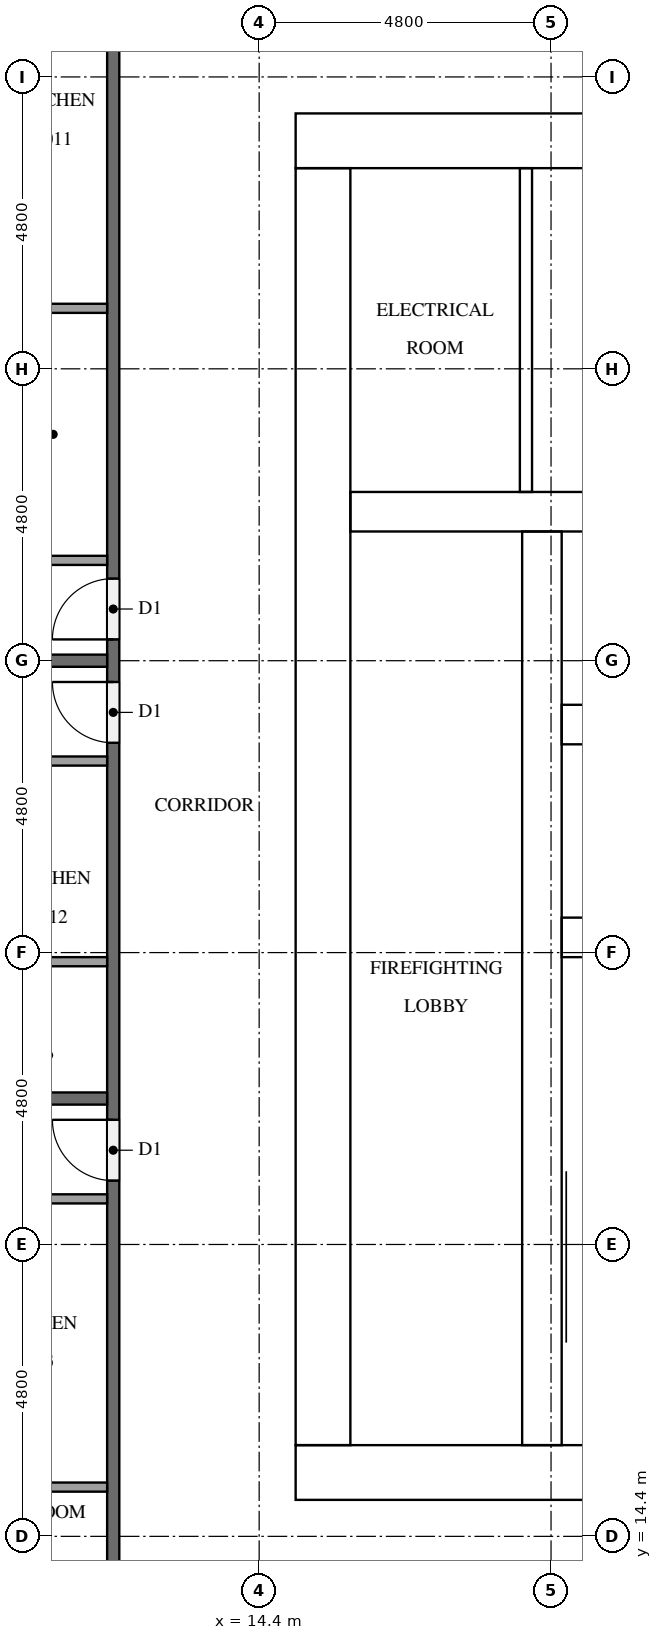
"""IFC4 building model, lengths in metres.
Left out: names, types, materials, properties, quantities, classifications, styles, units other than length and angle.
Written with IfcOpenShell. Run it as: python <this file> out.ifc"""

import sys

from ifc_helpers import new_model, si_unit, direction, frame, frame_2d, origin, place, context, subcontext, project, spatial, rectangle, extrude, element, fill, save


model = new_model("IFC4")
c1 = context("Model", 3, precision=1e-05, world=origin(), true_north=direction((0.0, 1.0)))
c2 = subcontext(c1, "Body", "Model", "MODEL_VIEW")
j1 = project(units=[si_unit("LENGTHUNIT", "METRE"), si_unit("PLANEANGLEUNIT", "RADIAN")], contexts=[c1])
p1 = place(None, origin())
s1 = spatial("IfcSite", under=j1, at=p1, CompositionType="ELEMENT")
p2 = place(p1, origin())
s2 = spatial("IfcBuilding", under=s1, at=p2, CompositionType="ELEMENT")
p3 = place(p2, frame((0.0, 0.0, 80.3)))
s3 = spatial("IfcBuildingStorey", under=s2, at=p3, CompositionType="ELEMENT", Elevation=80.3)
p4 = place(p3, frame((15.0, 15.45, 0.0), z_axis=(0.0, 0.0, 1.0), x_axis=(1.0, 0.0, 0.0)))
e1 = element("IfcWall", 1, at=p4, inside=s3, PredefinedType="SHEAR", context=c2, shape_type="SweptSolid", body=[
    extrude(rectangle(XDim=32.4, YDim=0.9, at=frame_2d((16.2, 0.0))), origin(), (0.0, 0.0, 1.0), 3.1),
])
p5 = place(p4, frame((15.3, 0.0, 0.0)))
e2 = element("IfcOpeningElement", 2, at=p5, cuts=e1, PredefinedType="OPENING", context=c2, shape_type="SweptSolid", body=[
    extrude(rectangle(XDim=1.8, YDim=2.1, at=frame_2d((0.9, 1.05))), frame((0.0, 0.46, 0.0), z_axis=(0.0, -1.0, 0.0), x_axis=(1.0, 0.0, 0.0)), (0.0, 0.0, 1.0), 0.92),
])
p6 = place(p3, frame((15.0, 37.35, 0.0), z_axis=(0.0, 0.0, 1.0), x_axis=(1.0, 0.0, 0.0)))
e3 = element("IfcWall", 3, at=p6, inside=s3, PredefinedType="SHEAR", context=c2, shape_type="SweptSolid", body=[
    extrude(rectangle(XDim=32.4, YDim=0.9, at=frame_2d((16.2, 0.0))), origin(), (0.0, 0.0, 1.0), 3.1),
])
p7 = place(p6, frame((15.3, 0.0, 0.0)))
e4 = element("IfcOpeningElement", 4, at=p7, cuts=e3, PredefinedType="OPENING", context=c2, shape_type="SweptSolid", body=[
    extrude(rectangle(XDim=1.8, YDim=2.1, at=frame_2d((0.9, 1.05))), frame((0.0, 0.46, 0.0), z_axis=(0.0, -1.0, 0.0), x_axis=(1.0, 0.0, 0.0)), (0.0, 0.0, 1.0), 0.92),
])
p8 = place(p6, frame((1.794, 0.0, 0.0)))
e5 = element("IfcOpeningElement", 5, at=p8, cuts=e3, PredefinedType="OPENING", context=c2, shape_type="SweptSolid", body=[
    extrude(rectangle(XDim=1.0, YDim=2.1, at=frame_2d((0.5, 1.05))), frame((0.0, 0.46, 0.0), z_axis=(0.0, -1.0, 0.0), x_axis=(1.0, 0.0, 0.0)), (0.0, 0.0, 1.0), 0.92),
])
p9 = place(p6, frame((5.331, 0.0, 0.0)))
e6 = element("IfcOpeningElement", 6, at=p9, cuts=e3, PredefinedType="OPENING", context=c2, shape_type="SweptSolid", body=[
    extrude(rectangle(XDim=1.0, YDim=2.1, at=frame_2d((0.5, 1.05))), frame((0.0, 0.46, 0.0), z_axis=(0.0, -1.0, 0.0), x_axis=(1.0, 0.0, 0.0)), (0.0, 0.0, 1.0), 0.92),
])
p10 = place(p3, frame((15.45, 15.9, 0.0), z_axis=(0.0, 0.0, 1.0), x_axis=(0.0, 1.0, 0.0)))
e7 = element("IfcWall", 7, at=p10, inside=s3, PredefinedType="SHEAR", context=c2, shape_type="SweptSolid", body=[
    extrude(rectangle(XDim=21.0, YDim=0.9, at=frame_2d((10.5, 0.0))), origin(), (0.0, 0.0, 1.0), 3.1),
])
p11 = place(p10, frame((4.86, 0.0, 0.0)))
e8 = element("IfcOpeningElement", 8, at=p11, cuts=e7, PredefinedType="OPENING", context=c2, shape_type="SweptSolid", body=[
    extrude(rectangle(XDim=1.2, YDim=2.1, at=frame_2d((0.6, 1.05))), frame((0.0, 0.46, 0.0), z_axis=(0.0, -1.0, 0.0), x_axis=(1.0, 0.0, 0.0)), (0.0, 0.0, 1.0), 0.92),
])
p12 = place(p3, frame((19.05, 15.9, 0.0), z_axis=(0.0, 0.0, 1.0), x_axis=(0.0, 1.0, 0.0)))
e9 = element("IfcWall", 9, at=p12, inside=s3, PredefinedType="SHEAR", context=c2, shape_type="SweptSolid", body=[
    extrude(rectangle(XDim=15.025, YDim=0.65, at=frame_2d((7.513, 0.0))), origin(), (0.0, 0.0, 1.0), 3.1),
])
p13 = place(p12, frame((9.55, 0.0, 0.0)))
e10 = element("IfcOpeningElement", 10, at=p13, cuts=e9, PredefinedType="OPENING", context=c2, shape_type="SweptSolid", body=[
    extrude(rectangle(XDim=1.1, YDim=2.1, at=frame_2d((0.55, 1.05))), frame((0.0, 0.335, 0.0), z_axis=(0.0, -1.0, 0.0), x_axis=(1.0, 0.0, 0.0)), (0.0, 0.0, 1.0), 0.67),
])
p14 = place(p12, frame((13.05, 0.0, 0.0)))
e11 = element("IfcOpeningElement", 11, at=p14, cuts=e9, PredefinedType="OPENING", context=c2, shape_type="SweptSolid", body=[
    extrude(rectangle(XDim=1.1, YDim=2.1, at=frame_2d((0.55, 1.05))), frame((0.0, 0.335, 0.0), z_axis=(0.0, -1.0, 0.0), x_axis=(1.0, 0.0, 0.0)), (0.0, 0.0, 1.0), 0.67),
])
p15 = place(p12, frame((0.3, 0.0, 0.0)))
e12 = element("IfcOpeningElement", 12, at=p15, cuts=e9, PredefinedType="OPENING", context=c2, shape_type="SweptSolid", body=[
    extrude(rectangle(XDim=1.2, YDim=2.1, at=frame_2d((0.6, 1.05))), frame((0.0, 0.335, 0.0), z_axis=(0.0, -1.0, 0.0), x_axis=(1.0, 0.0, 0.0)), (0.0, 0.0, 1.0), 0.67),
])
for number, where, z_axis, x_axis in (
    (13, (19.375, 24.25, 0.0), (0.0, 0.0, 1.0), (1.0, 0.0, 0.0)),
    (14, (19.375, 27.75, 0.0), (0.0, 0.0, 1.0), (1.0, 0.0, 0.0)),
):
    element("IfcWall", number, at=place(p3, frame(where, z_axis=z_axis, x_axis=x_axis)), inside=s3, PredefinedType="SHEAR", context=c2, shape_type="SweptSolid", body=[
        extrude(rectangle(XDim=3.4, YDim=0.65, at=frame_2d((1.7, 0.0))), origin(), (0.0, 0.0, 1.0), 3.1),
    ])
p16 = place(p3, frame((15.9, 31.25, 0.0), z_axis=(0.0, 0.0, 1.0), x_axis=(1.0, 0.0, 0.0)))
e15 = element("IfcWall", 15, at=p16, inside=s3, PredefinedType="SHEAR", context=c2, shape_type="SweptSolid", body=[
    extrude(rectangle(XDim=6.875, YDim=0.65, at=frame_2d((3.438, 0.0))), origin(), (0.0, 0.0, 1.0), 3.1),
])
p17 = place(p3, frame((18.788, 31.575, 0.0), z_axis=(0.0, 0.0, 1.0), x_axis=(0.0, 1.0, 0.0)))
e16 = element("IfcWall", 16, at=p17, inside=s3, PredefinedType="PARTITIONING", context=c2, shape_type="SweptSolid", body=[
    extrude(rectangle(XDim=5.325, YDim=0.2, at=frame_2d((2.663, 0.0))), origin(), (0.0, 0.0, 1.0), 3.1),
])
p18 = place(p3, frame((12.0, 12.1, 0.0), z_axis=(0.0, 0.0, 1.0), x_axis=(0.0, 1.0, 0.0)))
e17 = element("IfcWall", 17, at=p18, inside=s3, PredefinedType="PARTITIONING", context=c2, shape_type="SweptSolid", body=[
    extrude(rectangle(XDim=28.6, YDim=0.2, at=frame_2d((14.3, 0.0))), origin(), (0.0, 0.0, 1.0), 3.1),
])
p19 = place(p18, frame((17.05, 0.0, 0.0)))
e18 = element("IfcOpeningElement", 18, at=p19, cuts=e17, PredefinedType="OPENING", context=c2, shape_type="SweptSolid", body=[
    extrude(rectangle(XDim=1.0, YDim=2.1, at=frame_2d((0.5, 1.05))), frame((0.0, 0.11, 0.0), z_axis=(0.0, -1.0, 0.0), x_axis=(1.0, 0.0, 0.0)), (0.0, 0.0, 1.0), 0.22),
])
p20 = place(p18, frame((15.35, 0.0, 0.0)))
e19 = element("IfcOpeningElement", 19, at=p20, cuts=e17, PredefinedType="OPENING", context=c2, shape_type="SweptSolid", body=[
    extrude(rectangle(XDim=1.0, YDim=2.1, at=frame_2d((0.5, 1.05))), frame((0.0, 0.11, 0.0), z_axis=(0.0, -1.0, 0.0), x_axis=(1.0, 0.0, 0.0)), (0.0, 0.0, 1.0), 0.22),
])
p21 = place(p18, frame((8.15, 0.0, 0.0)))
e20 = element("IfcOpeningElement", 20, at=p21, cuts=e17, PredefinedType="OPENING", context=c2, shape_type="SweptSolid", body=[
    extrude(rectangle(XDim=1.0, YDim=2.1, at=frame_2d((0.5, 1.05))), frame((0.0, 0.11, 0.0), z_axis=(0.0, -1.0, 0.0), x_axis=(1.0, 0.0, 0.0)), (0.0, 0.0, 1.0), 0.22),
])
for number, where, z_axis, x_axis in (
    (21, (4.9, 28.8, 0.0), (0.0, 0.0, 1.0), (1.0, 0.0, 0.0)),
    (22, (4.9, 21.6, 0.0), (0.0, 0.0, 1.0), (1.0, 0.0, 0.0)),
):
    element("IfcWall", number, at=place(p3, frame(where, z_axis=z_axis, x_axis=x_axis)), inside=s3, PredefinedType="PARTITIONING", context=c2, shape_type="SweptSolid", body=[
        extrude(rectangle(XDim=7.0, YDim=0.2, at=frame_2d((3.5, 0.0))), origin(), (0.0, 0.0, 1.0), 3.1),
    ])
p22 = place(p3, frame((11.9, 34.595, 0.0), z_axis=(0.0, 0.0, 1.0), x_axis=(-1.0, 0.0, 0.0)))
e23 = element("IfcWall", 23, at=p22, inside=s3, PredefinedType="PARTITIONING", context=c2, shape_type="SweptSolid", body=[
    extrude(rectangle(XDim=1.775, YDim=0.15, at=frame_2d((0.887, 0.0))), origin(), (0.0, 0.0, 1.0), 3.1),
])
for number, where, z_axis, x_axis in (
    (24, (11.9, 30.45, 0.0), (0.0, 0.0, 1.0), (-1.0, 0.0, 0.0)),
    (25, (11.9, 23.85, 0.0), (0.0, 0.0, 1.0), (-1.0, 0.0, 0.0)),
):
    element("IfcWall", number, at=place(p3, frame(where, z_axis=z_axis, x_axis=x_axis)), inside=s3, PredefinedType="PARTITIONING", context=c2, shape_type="SweptSolid", body=[
        extrude(rectangle(XDim=1.925, YDim=0.15, at=frame_2d((0.962, 0.0))), origin(), (0.0, 0.0, 1.0), 3.1),
    ])
p23 = place(p3, frame((11.9, 27.15, 0.0), z_axis=(0.0, 0.0, 1.0), x_axis=(-1.0, 0.0, 0.0)))
e26 = element("IfcWall", 26, at=p23, inside=s3, PredefinedType="PARTITIONING", context=c2, shape_type="SweptSolid", body=[
    extrude(rectangle(XDim=2.075, YDim=0.15, at=frame_2d((1.038, 0.0))), origin(), (0.0, 0.0, 1.0), 3.1),
])
p24 = place(p3, frame((11.9, 15.21, 0.0), z_axis=(0.0, 0.0, 1.0), x_axis=(-1.0, 0.0, 0.0)))
e27 = element("IfcWall", 27, at=p24, inside=s3, PredefinedType="PARTITIONING", context=c2, shape_type="SweptSolid", body=[
    extrude(rectangle(XDim=2.375, YDim=0.15, at=frame_2d((1.188, 0.0))), origin(), (0.0, 0.0, 1.0), 3.1),
])
p25 = place(p3, frame((11.9, 19.95, 0.0), z_axis=(0.0, 0.0, 1.0), x_axis=(-1.0, 0.0, 0.0)))
e28 = element("IfcWall", 28, at=p25, inside=s3, PredefinedType="PARTITIONING", context=c2, shape_type="SweptSolid", body=[
    extrude(rectangle(XDim=2.525, YDim=0.15, at=frame_2d((1.262, 0.0))), origin(), (0.0, 0.0, 1.0), 3.1),
])
p26 = place(p13, origin())
e29 = element("IfcDoor", 29, at=p26, inside=s3, OperationType="DOUBLE_DOOR_SLIDING", PredefinedType="DOOR", context=c2, shape_type="SweptSolid", body=[
    extrude(rectangle(XDim=1.1, YDim=2.1, at=frame_2d((0.55, 1.05))), frame((0.0, 0.025, 0.0), z_axis=(0.0, -1.0, 0.0), x_axis=(1.0, 0.0, 0.0)), (0.0, 0.0, 1.0), 0.05),
])
fill(e10, e29)
p27 = place(p14, origin())
e30 = element("IfcDoor", 30, at=p27, inside=s3, OperationType="DOUBLE_DOOR_SLIDING", PredefinedType="DOOR", context=c2, shape_type="SweptSolid", body=[
    extrude(rectangle(XDim=1.1, YDim=2.1, at=frame_2d((0.55, 1.05))), frame((0.0, 0.025, 0.0), z_axis=(0.0, -1.0, 0.0), x_axis=(1.0, 0.0, 0.0)), (0.0, 0.0, 1.0), 0.05),
])
fill(e11, e30)
p28 = place(p15, frame((1.2, 0.0, 0.0), z_axis=(0.0, 0.0, 1.0), x_axis=(-1.0, 0.0, 0.0)))
e31 = element("IfcDoor", 31, at=p28, inside=s3, OperationType="SINGLE_SWING_RIGHT", PredefinedType="DOOR", context=c2, shape_type="SweptSolid", body=[
    extrude(rectangle(XDim=1.2, YDim=2.1, at=frame_2d((0.6, 1.05))), frame((0.0, 0.025, 0.0), z_axis=(0.0, -1.0, 0.0), x_axis=(1.0, 0.0, 0.0)), (0.0, 0.0, 1.0), 0.05),
])
fill(e12, e31)
p29 = place(p11, frame((1.2, 0.0, 0.0), z_axis=(0.0, 0.0, 1.0), x_axis=(-1.0, 0.0, 0.0)))
e32 = element("IfcDoor", 32, at=p29, inside=s3, OperationType="SINGLE_SWING_LEFT", PredefinedType="DOOR", context=c2, shape_type="SweptSolid", body=[
    extrude(rectangle(XDim=1.2, YDim=2.1, at=frame_2d((0.6, 1.05))), frame((0.0, 0.025, 0.0), z_axis=(0.0, -1.0, 0.0), x_axis=(1.0, 0.0, 0.0)), (0.0, 0.0, 1.0), 0.05),
])
fill(e8, e32)
p30 = place(p8, origin())
e33 = element("IfcDoor", 33, at=p30, inside=s3, OperationType="SINGLE_SWING_LEFT", PredefinedType="DOOR", context=c2, shape_type="SweptSolid", body=[
    extrude(rectangle(XDim=1.0, YDim=2.1, at=frame_2d((0.5, 1.05))), frame((0.0, 0.025, 0.0), z_axis=(0.0, -1.0, 0.0), x_axis=(1.0, 0.0, 0.0)), (0.0, 0.0, 1.0), 0.05),
])
fill(e5, e33)
p31 = place(p19, origin())
e34 = element("IfcDoor", 34, at=p31, inside=s3, OperationType="SINGLE_SWING_LEFT", PredefinedType="DOOR", context=c2, shape_type="SweptSolid", body=[
    extrude(rectangle(XDim=1.0, YDim=2.1, at=frame_2d((0.5, 1.05))), frame((0.0, 0.025, 0.0), z_axis=(0.0, -1.0, 0.0), x_axis=(1.0, 0.0, 0.0)), (0.0, 0.0, 1.0), 0.05),
])
fill(e18, e34)
p32 = place(p20, origin())
e35 = element("IfcDoor", 35, at=p32, inside=s3, OperationType="SINGLE_SWING_RIGHT", PredefinedType="DOOR", context=c2, shape_type="SweptSolid", body=[
    extrude(rectangle(XDim=1.0, YDim=2.1, at=frame_2d((0.5, 1.05))), frame((0.0, 0.025, 0.0), z_axis=(0.0, -1.0, 0.0), x_axis=(1.0, 0.0, 0.0)), (0.0, 0.0, 1.0), 0.05),
])
fill(e19, e35)
p33 = place(p21, origin())
e36 = element("IfcDoor", 36, at=p33, inside=s3, OperationType="SINGLE_SWING_RIGHT", PredefinedType="DOOR", context=c2, shape_type="SweptSolid", body=[
    extrude(rectangle(XDim=1.0, YDim=2.1, at=frame_2d((0.5, 1.05))), frame((0.0, 0.025, 0.0), z_axis=(0.0, -1.0, 0.0), x_axis=(1.0, 0.0, 0.0)), (0.0, 0.0, 1.0), 0.05),
])
fill(e20, e36)
save(model, sys.argv[1])
